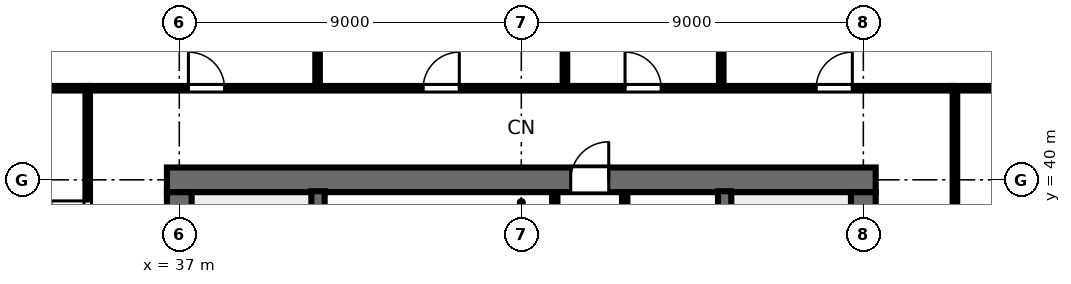
"""IFC4 building model, lengths in metres.
Left out: names, types, materials, properties, quantities, classifications, styles, units other than length and angle.
Written with IfcOpenShell. Run it as: python <this file> out.ifc"""

import sys

from ifc_helpers import new_model, si_unit, direction, frame, frame_2d, origin, place, context, subcontext, project, spatial, rectangle, extrude, element, fill, save


model = new_model("IFC4")
c1 = context("Model", 3, precision=1e-05, world=origin(), true_north=direction((0.0, 1.0)))
c2 = subcontext(c1, "Body", "Model", "MODEL_VIEW")
j1 = project(units=[si_unit("LENGTHUNIT", "METRE"), si_unit("PLANEANGLEUNIT", "RADIAN")], contexts=[c1])
p1 = place(None, origin())
s1 = spatial("IfcSite", under=j1, at=p1, CompositionType="ELEMENT")
p2 = place(p1, origin())
s2 = spatial("IfcBuilding", under=s1, at=p2, CompositionType="ELEMENT")
p3 = place(p2, frame((0.0, 0.0, 64.0)))
s3 = spatial("IfcBuildingStorey", under=s2, at=p3, CompositionType="ELEMENT", Elevation=64.0)
p4 = place(p3, frame((36.675, 40.0, 0.0), z_axis=(0.0, 0.0, 1.0), x_axis=(1.0, 0.0, 0.0)))
e1 = element("IfcWall", 1, at=p4, inside=s3, PredefinedType="SHEAR", context=c2, shape_type="SweptSolid", body=[
    extrude(rectangle(XDim=18.65, YDim=0.65, at=frame_2d((9.325, 0.0))), origin(), (0.0, 0.0, 1.0), 3.36),
])
p5 = place(p4, frame((10.625, 0.0, 0.0)))
e2 = element("IfcOpeningElement", 2, at=p5, cuts=e1, PredefinedType="OPENING", context=c2, shape_type="SweptSolid", body=[
    extrude(rectangle(XDim=1.0, YDim=2.15, at=frame_2d((0.5, 1.075))), frame((0.0, 0.335, 0.0), z_axis=(0.0, -1.0, 0.0), x_axis=(1.0, 0.0, 0.0)), (0.0, 0.0, 1.0), 0.67),
])
p6 = place(p3, frame((37.0, 24.325, 0.0), z_axis=(0.0, 0.0, 1.0), x_axis=(0.0, 1.0, 0.0)))
e3 = element("IfcWall", 3, at=p6, inside=s3, PredefinedType="SHEAR", context=c2, shape_type="SweptSolid", body=[
    extrude(rectangle(XDim=15.35, YDim=0.65, at=frame_2d((7.675, 0.0))), origin(), (0.0, 0.0, 1.0), 3.36),
])
p7 = place(p6, frame((5.2, 0.0, 0.0)))
e4 = element("IfcOpeningElement", 4, at=p7, cuts=e3, PredefinedType="OPENING", context=c2, shape_type="SweptSolid", body=[
    extrude(rectangle(XDim=1.15, YDim=2.15, at=frame_2d((0.575, 1.075))), frame((0.0, 0.335, 0.0), z_axis=(0.0, -1.0, 0.0), x_axis=(1.0, 0.0, 0.0)), (0.0, 0.0, 1.0), 0.67),
])
p8 = place(p3, frame((55.0, 24.325, 0.0), z_axis=(0.0, 0.0, 1.0), x_axis=(0.0, 1.0, 0.0)))
e5 = element("IfcWall", 5, at=p8, inside=s3, PredefinedType="SHEAR", context=c2, shape_type="SweptSolid", body=[
    extrude(rectangle(XDim=15.35, YDim=0.65, at=frame_2d((7.675, 0.0))), origin(), (0.0, 0.0, 1.0), 3.36),
])
p9 = place(p8, frame((5.2, 0.0, 0.0)))
e6 = element("IfcOpeningElement", 6, at=p9, cuts=e5, PredefinedType="OPENING", context=c2, shape_type="SweptSolid", body=[
    extrude(rectangle(XDim=1.15, YDim=2.15, at=frame_2d((0.575, 1.075))), frame((0.0, 0.335, 0.0), z_axis=(0.0, -1.0, 0.0), x_axis=(1.0, 0.0, 0.0)), (0.0, 0.0, 1.0), 0.67),
])
for number, where, z_axis, x_axis in (
    (7, (40.65, 32.0, 0.0), (0.0, 0.0, 1.0), (0.0, 1.0, 0.0)),
    (8, (51.35, 32.0, 0.0), (0.0, 0.0, 1.0), (0.0, 1.0, 0.0)),
):
    element("IfcWall", number, at=place(p3, frame(where, z_axis=z_axis, x_axis=x_axis)), inside=s3, PredefinedType="SHEAR", context=c2, shape_type="SweptSolid", body=[
        extrude(rectangle(XDim=7.7, YDim=0.35, at=frame_2d((3.85, 0.0))), origin(), (0.0, 0.0, 1.0), 3.6),
    ])
p10 = place(p3, frame((46.88, 32.05, 0.0), z_axis=(0.0, 0.0, 1.0), x_axis=(0.0, 1.0, 0.0)))
e9 = element("IfcWall", 9, at=p10, inside=s3, PredefinedType="PARTITIONING", context=c2, shape_type="SweptSolid", body=[
    extrude(rectangle(XDim=7.6, YDim=0.14, at=frame_2d((3.8, 0.0))), origin(), (0.0, 0.0, 1.0), 3.36),
])
p11 = place(p10, frame((3.4, 0.0, 0.0)))
e10 = element("IfcOpeningElement", 10, at=p11, cuts=e9, PredefinedType="OPENING", context=c2, shape_type="SweptSolid", body=[
    extrude(rectangle(XDim=0.95, YDim=2.15, at=frame_2d((0.475, 1.075))), frame((0.0, 0.08, 0.0), z_axis=(0.0, -1.0, 0.0), x_axis=(1.0, 0.0, 0.0)), (0.0, 0.0, 1.0), 0.16),
])
p12 = place(p3, frame((48.72, 32.05, 0.0), z_axis=(0.0, 0.0, 1.0), x_axis=(0.0, 1.0, 0.0)))
e11 = element("IfcWall", 11, at=p12, inside=s3, PredefinedType="PARTITIONING", context=c2, shape_type="SweptSolid", body=[
    extrude(rectangle(XDim=7.6, YDim=0.14, at=frame_2d((3.8, 0.0))), origin(), (0.0, 0.0, 1.0), 3.36),
])
p13 = place(p12, frame((0.8, 0.0, 0.0)))
e12 = element("IfcOpeningElement", 12, at=p13, cuts=e11, PredefinedType="OPENING", context=c2, shape_type="SweptSolid", body=[
    extrude(rectangle(XDim=0.9, YDim=2.15, at=frame_2d((0.45, 1.075))), frame((0.0, 0.08, 0.0), z_axis=(0.0, -1.0, 0.0), x_axis=(1.0, 0.0, 0.0)), (0.0, 0.0, 1.0), 0.16),
])
p14 = place(p12, frame((3.35, 0.0, 0.0)))
e13 = element("IfcOpeningElement", 13, at=p14, cuts=e11, PredefinedType="OPENING", context=c2, shape_type="SweptSolid", body=[
    extrude(rectangle(XDim=0.9, YDim=2.15, at=frame_2d((0.45, 1.075))), frame((0.0, 0.08, 0.0), z_axis=(0.0, -1.0, 0.0), x_axis=(1.0, 0.0, 0.0)), (0.0, 0.0, 1.0), 0.16),
])
p15 = place(p12, frame((5.9, 0.0, 0.0)))
e14 = element("IfcOpeningElement", 14, at=p15, cuts=e11, PredefinedType="OPENING", context=c2, shape_type="SweptSolid", body=[
    extrude(rectangle(XDim=0.92, YDim=2.15, at=frame_2d((0.46, 1.075))), frame((0.0, 0.08, 0.0), z_axis=(0.0, -1.0, 0.0), x_axis=(1.0, 0.0, 0.0)), (0.0, 0.0, 1.0), 0.16),
])
p16 = place(p3, frame((40.639, 42.41, 0.0), z_axis=(0.0, 0.0, 1.0), x_axis=(0.0, 1.0, 0.0)))
e15 = element("IfcWall", 15, at=p16, inside=s3, PredefinedType="PARTITIONING", context=c2, shape_type="SweptSolid", body=[
    extrude(rectangle(XDim=11.11, YDim=0.12, at=frame_2d((5.555, 0.0))), origin(), (0.0, 0.0, 1.0), 2.64),
])
p17 = place(p16, frame((1.4, 0.0, 0.0)))
e16 = element("IfcOpeningElement", 16, at=p17, cuts=e15, PredefinedType="OPENING", context=c2, shape_type="SweptSolid", body=[
    extrude(rectangle(XDim=0.9, YDim=2.15, at=frame_2d((0.45, 1.075))), frame((0.0, 0.07, 0.0), z_axis=(0.0, -1.0, 0.0), x_axis=(1.0, 0.0, 0.0)), (0.0, 0.0, 1.0), 0.14),
])
p18 = place(p3, frame((47.148, 42.41, 0.0), z_axis=(0.0, 0.0, 1.0), x_axis=(0.0, 1.0, 0.0)))
e17 = element("IfcWall", 17, at=p18, inside=s3, PredefinedType="PARTITIONING", context=c2, shape_type="SweptSolid", body=[
    extrude(rectangle(XDim=11.11, YDim=0.12, at=frame_2d((5.555, 0.0))), origin(), (0.0, 0.0, 1.0), 2.64),
])
p19 = place(p18, frame((1.4, 0.0, 0.0)))
e18 = element("IfcOpeningElement", 18, at=p19, cuts=e17, PredefinedType="OPENING", context=c2, shape_type="SweptSolid", body=[
    extrude(rectangle(XDim=0.9, YDim=2.15, at=frame_2d((0.45, 1.075))), frame((0.0, 0.07, 0.0), z_axis=(0.0, -1.0, 0.0), x_axis=(1.0, 0.0, 0.0)), (0.0, 0.0, 1.0), 0.14),
])
p20 = place(p3, frame((51.261, 42.41, 0.0), z_axis=(0.0, 0.0, 1.0), x_axis=(0.0, 1.0, 0.0)))
e19 = element("IfcWall", 19, at=p20, inside=s3, PredefinedType="PARTITIONING", context=c2, shape_type="SweptSolid", body=[
    extrude(rectangle(XDim=11.11, YDim=0.12, at=frame_2d((5.555, 0.0))), origin(), (0.0, 0.0, 1.0), 2.64),
])
p21 = place(p20, frame((1.4, 0.0, 0.0)))
e20 = element("IfcOpeningElement", 20, at=p21, cuts=e19, PredefinedType="OPENING", context=c2, shape_type="SweptSolid", body=[
    extrude(rectangle(XDim=0.9, YDim=2.15, at=frame_2d((0.45, 1.075))), frame((0.0, 0.07, 0.0), z_axis=(0.0, -1.0, 0.0), x_axis=(1.0, 0.0, 0.0)), (0.0, 0.0, 1.0), 0.14),
])
p22 = place(p3, frame((34.65, 42.41, 0.0), z_axis=(0.0, 0.0, 1.0), x_axis=(1.0, 0.0, 0.0)))
e21 = element("IfcWall", 21, at=p22, inside=s3, PredefinedType="PARTITIONING", context=c2, shape_type="SweptSolid", body=[
    extrude(rectangle(XDim=22.7, YDim=0.12, at=frame_2d((11.35, 0.0))), origin(), (0.0, 0.0, 1.0), 2.64),
])
p23 = place(p22, frame((2.59, 0.0, 0.0)))
e22 = element("IfcOpeningElement", 22, at=p23, cuts=e21, PredefinedType="OPENING", context=c2, shape_type="SweptSolid", body=[
    extrude(rectangle(XDim=0.95, YDim=2.15, at=frame_2d((0.475, 1.075))), frame((0.0, 0.07, 0.0), z_axis=(0.0, -1.0, 0.0), x_axis=(1.0, 0.0, 0.0)), (0.0, 0.0, 1.0), 0.14),
])
p24 = place(p22, frame((8.768, 0.0, 0.0)))
e23 = element("IfcOpeningElement", 23, at=p24, cuts=e21, PredefinedType="OPENING", context=c2, shape_type="SweptSolid", body=[
    extrude(rectangle(XDim=0.95, YDim=2.15, at=frame_2d((0.475, 1.075))), frame((0.0, 0.07, 0.0), z_axis=(0.0, -1.0, 0.0), x_axis=(1.0, 0.0, 0.0)), (0.0, 0.0, 1.0), 0.14),
])
p25 = place(p22, frame((14.079, 0.0, 0.0)))
e24 = element("IfcOpeningElement", 24, at=p25, cuts=e21, PredefinedType="OPENING", context=c2, shape_type="SweptSolid", body=[
    extrude(rectangle(XDim=0.95, YDim=2.15, at=frame_2d((0.475, 1.075))), frame((0.0, 0.07, 0.0), z_axis=(0.0, -1.0, 0.0), x_axis=(1.0, 0.0, 0.0)), (0.0, 0.0, 1.0), 0.14),
])
p26 = place(p22, frame((19.11, 0.0, 0.0)))
e25 = element("IfcOpeningElement", 25, at=p26, cuts=e21, PredefinedType="OPENING", context=c2, shape_type="SweptSolid", body=[
    extrude(rectangle(XDim=0.95, YDim=2.15, at=frame_2d((0.475, 1.075))), frame((0.0, 0.07, 0.0), z_axis=(0.0, -1.0, 0.0), x_axis=(1.0, 0.0, 0.0)), (0.0, 0.0, 1.0), 0.14),
])
p27 = place(p3, frame((34.59, 21.65, 0.0), z_axis=(0.0, 0.0, 1.0), x_axis=(0.0, 1.0, 0.0)))
e26 = element("IfcWall", 26, at=p27, inside=s3, PredefinedType="PARTITIONING", context=c2, shape_type="SweptSolid", body=[
    extrude(rectangle(XDim=20.7, YDim=0.12, at=frame_2d((10.35, 0.0))), origin(), (0.0, 0.0, 1.0), 2.64),
])
p28 = place(p27, frame((6.696, 0.0, 0.0)))
e27 = element("IfcOpeningElement", 27, at=p28, cuts=e26, PredefinedType="OPENING", context=c2, shape_type="SweptSolid", body=[
    extrude(rectangle(XDim=0.95, YDim=2.15, at=frame_2d((0.475, 1.075))), frame((0.0, 0.07, 0.0), z_axis=(0.0, -1.0, 0.0), x_axis=(1.0, 0.0, 0.0)), (0.0, 0.0, 1.0), 0.14),
])
p29 = place(p27, frame((16.846, 0.0, 0.0)))
e28 = element("IfcOpeningElement", 28, at=p29, cuts=e26, PredefinedType="OPENING", context=c2, shape_type="SweptSolid", body=[
    extrude(rectangle(XDim=0.95, YDim=2.15, at=frame_2d((0.475, 1.075))), frame((0.0, 0.07, 0.0), z_axis=(0.0, -1.0, 0.0), x_axis=(1.0, 0.0, 0.0)), (0.0, 0.0, 1.0), 0.14),
])
p30 = place(p3, frame((57.41, 21.65, 0.0), z_axis=(0.0, 0.0, 1.0), x_axis=(0.0, 1.0, 0.0)))
e29 = element("IfcWall", 29, at=p30, inside=s3, PredefinedType="PARTITIONING", context=c2, shape_type="SweptSolid", body=[
    extrude(rectangle(XDim=20.7, YDim=0.12, at=frame_2d((10.35, 0.0))), origin(), (0.0, 0.0, 1.0), 2.64),
])
p31 = place(p30, frame((3.502, 0.0, 0.0)))
e30 = element("IfcOpeningElement", 30, at=p31, cuts=e29, PredefinedType="OPENING", context=c2, shape_type="SweptSolid", body=[
    extrude(rectangle(XDim=0.95, YDim=2.15, at=frame_2d((0.475, 1.075))), frame((0.0, 0.07, 0.0), z_axis=(0.0, -1.0, 0.0), x_axis=(1.0, 0.0, 0.0)), (0.0, 0.0, 1.0), 0.14),
])
p32 = place(p30, frame((13.652, 0.0, 0.0)))
e31 = element("IfcOpeningElement", 31, at=p32, cuts=e29, PredefinedType="OPENING", context=c2, shape_type="SweptSolid", body=[
    extrude(rectangle(XDim=0.95, YDim=2.15, at=frame_2d((0.475, 1.075))), frame((0.0, 0.07, 0.0), z_axis=(0.0, -1.0, 0.0), x_axis=(1.0, 0.0, 0.0)), (0.0, 0.0, 1.0), 0.14),
])
for number, where, z_axis, x_axis in (
    (32, (34.65, 42.41, 0.0), (0.0, 0.0, 1.0), (-1.0, 0.0, 0.0)),
    (33, (57.35, 42.41, 0.0), (0.0, 0.0, 1.0), (1.0, 0.0, 0.0)),
):
    element("IfcWall", number, at=place(p3, frame(where, z_axis=z_axis, x_axis=x_axis)), inside=s3, PredefinedType="PARTITIONING", context=c2, shape_type="SweptSolid", body=[
        extrude(rectangle(XDim=13.12, YDim=0.12, at=frame_2d((6.56, 0.0))), origin(), (0.0, 0.0, 1.0), 2.64),
    ])
p33 = place(p5, origin())
e34 = element("IfcDoor", 34, at=p33, inside=s3, OperationType="SINGLE_SWING_RIGHT", PredefinedType="DOOR", context=c2, shape_type="SweptSolid", body=[
    extrude(rectangle(XDim=1.0, YDim=2.15, at=frame_2d((0.5, 1.075))), frame((0.0, 0.025, 0.0), z_axis=(0.0, -1.0, 0.0), x_axis=(1.0, 0.0, 0.0)), (0.0, 0.0, 1.0), 0.05),
])
fill(e2, e34)
p34 = place(p23, origin())
e35 = element("IfcDoor", 35, at=p34, inside=s3, OperationType="SINGLE_SWING_LEFT", PredefinedType="DOOR", context=c2, shape_type="SweptSolid", body=[
    extrude(rectangle(XDim=0.95, YDim=2.15, at=frame_2d((0.475, 1.075))), frame((0.0, 0.025, 0.0), z_axis=(0.0, -1.0, 0.0), x_axis=(1.0, 0.0, 0.0)), (0.0, 0.0, 1.0), 0.05),
])
fill(e22, e35)
p35 = place(p24, origin())
e36 = element("IfcDoor", 36, at=p35, inside=s3, OperationType="SINGLE_SWING_RIGHT", PredefinedType="DOOR", context=c2, shape_type="SweptSolid", body=[
    extrude(rectangle(XDim=0.95, YDim=2.15, at=frame_2d((0.475, 1.075))), frame((0.0, 0.025, 0.0), z_axis=(0.0, -1.0, 0.0), x_axis=(1.0, 0.0, 0.0)), (0.0, 0.0, 1.0), 0.05),
])
fill(e23, e36)
p36 = place(p25, origin())
e37 = element("IfcDoor", 37, at=p36, inside=s3, OperationType="SINGLE_SWING_LEFT", PredefinedType="DOOR", context=c2, shape_type="SweptSolid", body=[
    extrude(rectangle(XDim=0.95, YDim=2.15, at=frame_2d((0.475, 1.075))), frame((0.0, 0.025, 0.0), z_axis=(0.0, -1.0, 0.0), x_axis=(1.0, 0.0, 0.0)), (0.0, 0.0, 1.0), 0.05),
])
fill(e24, e37)
p37 = place(p26, origin())
e38 = element("IfcDoor", 38, at=p37, inside=s3, OperationType="SINGLE_SWING_RIGHT", PredefinedType="DOOR", context=c2, shape_type="SweptSolid", body=[
    extrude(rectangle(XDim=0.95, YDim=2.15, at=frame_2d((0.475, 1.075))), frame((0.0, 0.025, 0.0), z_axis=(0.0, -1.0, 0.0), x_axis=(1.0, 0.0, 0.0)), (0.0, 0.0, 1.0), 0.05),
])
fill(e25, e38)
p38 = place(p29, origin())
e39 = element("IfcDoor", 39, at=p38, inside=s3, OperationType="SINGLE_SWING_RIGHT", PredefinedType="DOOR", context=c2, shape_type="SweptSolid", body=[
    extrude(rectangle(XDim=0.95, YDim=2.15, at=frame_2d((0.475, 1.075))), frame((0.0, 0.025, 0.0), z_axis=(0.0, -1.0, 0.0), x_axis=(1.0, 0.0, 0.0)), (0.0, 0.0, 1.0), 0.05),
])
fill(e28, e39)
save(model, sys.argv[1])
